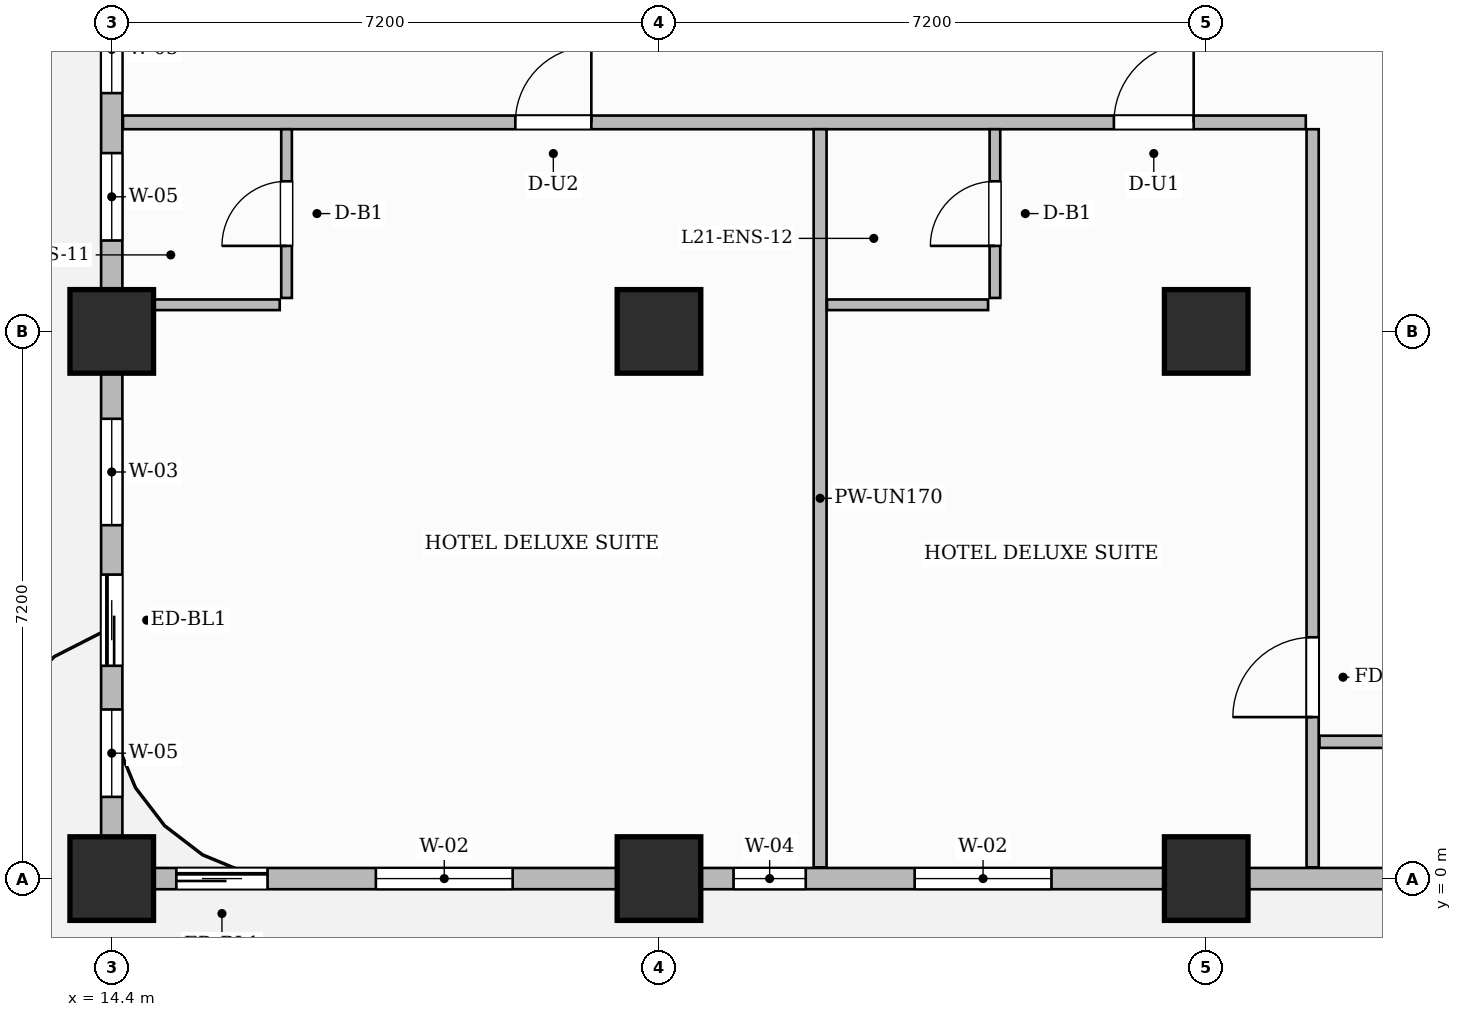
"""IFC4 building model, lengths in metres.
Left out: names, types, materials, properties, quantities, classifications, styles, units other than length and angle.
Written with IfcOpenShell. Run it as: python <this file> out.ifc"""

import sys

from ifc_helpers import new_model, si_unit, direction, frame, frame_2d, origin, origin_2d, place, context, subcontext, project, spatial, rectangle, extrude, source, transform, mapped, element, fill, save


model = new_model("IFC4")
c1 = context("Model", 3, precision=1e-05, world=origin(), true_north=direction((0.0, 1.0)))
c2 = subcontext(c1, "Body", "Model", "MODEL_VIEW")
j1 = project(units=[si_unit("LENGTHUNIT", "METRE"), si_unit("PLANEANGLEUNIT", "RADIAN")], contexts=[c1])
p1 = place(None, origin())
s1 = spatial("IfcSite", under=j1, at=p1, CompositionType="ELEMENT")
p2 = place(p1, origin())
s2 = spatial("IfcBuilding", under=s1, at=p2, CompositionType="ELEMENT")
p3 = place(p2, frame((0.0, 0.0, 87.9)))
s3 = spatial("IfcBuildingStorey", under=s2, at=p3, CompositionType="ELEMENT", Elevation=87.9)
m1 = source(origin(), c2, "Body", "SweptSolid", [
    extrude(rectangle(XDim=1.1, YDim=1.1, at=origin_2d()), origin(), (0.0, 0.0, 1.0), 3.7),
])
for number, where, z_axis, x_axis in (
    (1, (14.4, 0.0, 0.0), (0.0, 0.0, 1.0), (1.0, 0.0, 0.0)),
    (2, (14.4, 7.2, 0.0), (0.0, 0.0, 1.0), (1.0, 0.0, 0.0)),
    (3, (21.6, 0.0, 0.0), (0.0, 0.0, 1.0), (1.0, 0.0, 0.0)),
    (4, (21.6, 7.2, 0.0), (0.0, 0.0, 1.0), (1.0, 0.0, 0.0)),
    (5, (28.8, 0.0, 0.0), (0.0, 0.0, 1.0), (1.0, 0.0, 0.0)),
    (6, (28.8, 7.2, 0.0), (0.0, 0.0, 1.0), (1.0, 0.0, 0.0)),
):
    element("IfcColumn", number, at=place(p3, frame(where, z_axis=z_axis, x_axis=x_axis)), inside=s3, PredefinedType="COLUMN", context=c2, shape_type="MappedRepresentation", body=[
        mapped(m1, transform((0.0, 0.0, 0.0), scale=1.0)),
    ])
p4 = place(p3, frame((14.548, 9.95, 0.0), z_axis=(0.0, 0.0, 1.0), x_axis=(1.0, 0.0, 0.0)))
e7 = element("IfcWall", 7, at=p4, inside=s3, PredefinedType="PARTITIONING", context=c2, shape_type="SweptSolid", body=[
    extrude(rectangle(XDim=15.562, YDim=0.18, at=frame_2d((7.781, 0.0))), origin(), (0.0, 0.0, 1.0), 3.45),
])
p5 = place(p4, frame((5.162, 0.0, 0.0)))
e8 = element("IfcOpeningElement", 8, at=p5, cuts=e7, PredefinedType="OPENING", context=c2, shape_type="SweptSolid", body=[
    extrude(rectangle(XDim=1.0, YDim=2.2, at=frame_2d((0.5, 1.1))), frame((0.0, 0.1, 0.0), z_axis=(0.0, -1.0, 0.0), x_axis=(1.0, 0.0, 0.0)), (0.0, 0.0, 1.0), 0.2),
])
p6 = place(p4, frame((13.037, 0.0, 0.0)))
e9 = element("IfcOpeningElement", 9, at=p6, cuts=e7, PredefinedType="OPENING", context=c2, shape_type="SweptSolid", body=[
    extrude(rectangle(XDim=1.05, YDim=2.25, at=frame_2d((0.525, 1.125))), frame((0.0, 0.1, 0.0), z_axis=(0.0, -1.0, 0.0), x_axis=(1.0, 0.0, 0.0)), (0.0, 0.0, 1.0), 0.2),
])
p7 = place(p3, frame((30.2, 0.148, 0.0), z_axis=(0.0, 0.0, 1.0), x_axis=(0.0, 1.0, 0.0)))
e10 = element("IfcWall", 10, at=p7, inside=s3, PredefinedType="PARTITIONING", context=c2, shape_type="SweptSolid", body=[
    extrude(rectangle(XDim=9.712, YDim=0.16, at=frame_2d((4.856, 0.0))), origin(), (0.0, 0.0, 1.0), 3.45),
])
p8 = place(p7, frame((1.977, 0.0, 0.0)))
e11 = element("IfcOpeningElement", 11, at=p8, cuts=e10, PredefinedType="OPENING", context=c2, shape_type="SweptSolid", body=[
    extrude(rectangle(XDim=1.05, YDim=2.15, at=frame_2d((0.525, 1.075))), frame((0.0, 0.09, 0.0), z_axis=(0.0, -1.0, 0.0), x_axis=(1.0, 0.0, 0.0)), (0.0, 0.0, 1.0), 0.18),
])
p9 = place(p3, frame((30.29, 1.8, 0.0), z_axis=(0.0, 0.0, 1.0), x_axis=(1.0, 0.0, 0.0)))
e12 = element("IfcWall", 12, at=p9, inside=s3, PredefinedType="PARTITIONING", context=c2, shape_type="SweptSolid", body=[
    extrude(rectangle(XDim=19.37, YDim=0.16, at=frame_2d((9.685, 0.0))), origin(), (0.0, 0.0, 1.0), 3.45),
])
p10 = place(p9, frame((9.735, 0.0, 0.0)))
e13 = element("IfcOpeningElement", 13, at=p10, cuts=e12, PredefinedType="OPENING", context=c2, shape_type="SweptSolid", body=[
    extrude(rectangle(XDim=0.95, YDim=2.15, at=frame_2d((0.475, 1.075))), frame((0.0, 0.09, 0.0), z_axis=(0.0, -1.0, 0.0), x_axis=(1.0, 0.0, 0.0)), (0.0, 0.0, 1.0), 0.18),
])
p11 = place(p3, frame((23.72, 0.148, 0.0), z_axis=(0.0, 0.0, 1.0), x_axis=(0.0, 1.0, 0.0)))
e14 = element("IfcWall", 14, at=p11, inside=s3, PredefinedType="PARTITIONING", context=c2, shape_type="SweptSolid", body=[
    extrude(rectangle(XDim=9.712, YDim=0.17, at=frame_2d((4.856, 0.0))), origin(), (0.0, 0.0, 1.0), 3.45),
])
p12 = place(p3, frame((16.7, 7.64, 0.0), z_axis=(0.0, 0.0, 1.0), x_axis=(0.0, 1.0, 0.0)))
e15 = element("IfcWall", 15, at=p12, inside=s3, PredefinedType="PARTITIONING", context=c2, shape_type="SweptSolid", body=[
    extrude(rectangle(XDim=2.22, YDim=0.14, at=frame_2d((1.11, 0.0))), origin(), (0.0, 0.0, 1.0), 3.45),
])
p13 = place(p12, frame((0.685, 0.0, 0.0)))
e16 = element("IfcOpeningElement", 16, at=p13, cuts=e15, PredefinedType="OPENING", context=c2, shape_type="SweptSolid", body=[
    extrude(rectangle(XDim=0.85, YDim=2.1, at=frame_2d((0.425, 1.05))), frame((0.0, 0.08, 0.0), z_axis=(0.0, -1.0, 0.0), x_axis=(1.0, 0.0, 0.0)), (0.0, 0.0, 1.0), 0.16),
])
p14 = place(p3, frame((14.49, 7.55, 0.0), z_axis=(0.0, 0.0, 1.0), x_axis=(1.0, 0.0, 0.0)))
e17 = element("IfcWall", 17, at=p14, inside=s3, PredefinedType="PARTITIONING", context=c2, shape_type="SweptSolid", body=[
    extrude(rectangle(XDim=2.12, YDim=0.14, at=frame_2d((1.06, 0.0))), origin(), (0.0, 0.0, 1.0), 3.45),
])
p15 = place(p3, frame((26.02, 7.64, 0.0), z_axis=(0.0, 0.0, 1.0), x_axis=(0.0, 1.0, 0.0)))
e18 = element("IfcWall", 18, at=p15, inside=s3, PredefinedType="PARTITIONING", context=c2, shape_type="SweptSolid", body=[
    extrude(rectangle(XDim=2.22, YDim=0.14, at=frame_2d((1.11, 0.0))), origin(), (0.0, 0.0, 1.0), 3.45),
])
p16 = place(p15, frame((0.685, 0.0, 0.0)))
e19 = element("IfcOpeningElement", 19, at=p16, cuts=e18, PredefinedType="OPENING", context=c2, shape_type="SweptSolid", body=[
    extrude(rectangle(XDim=0.85, YDim=2.1, at=frame_2d((0.425, 1.05))), frame((0.0, 0.08, 0.0), z_axis=(0.0, -1.0, 0.0), x_axis=(1.0, 0.0, 0.0)), (0.0, 0.0, 1.0), 0.16),
])
p17 = place(p3, frame((23.81, 7.55, 0.0), z_axis=(0.0, 0.0, 1.0), x_axis=(1.0, 0.0, 0.0)))
e20 = element("IfcWall", 20, at=p17, inside=s3, PredefinedType="PARTITIONING", context=c2, shape_type="SweptSolid", body=[
    extrude(rectangle(XDim=2.12, YDim=0.14, at=frame_2d((1.06, 0.0))), origin(), (0.0, 0.0, 1.0), 3.45),
])
p18 = place(p3, frame((14.4, 0.0, 0.0), z_axis=(0.0, 0.0, 1.0), x_axis=(1.0, 0.0, 0.0)))
e21 = element("IfcWall", 21, at=p18, inside=s3, PredefinedType="SOLIDWALL", context=c2, shape_type="SweptSolid", body=[
    extrude(rectangle(XDim=43.2, YDim=0.28, at=frame_2d((21.6, 0.0))), origin(), (0.0, 0.0, 1.0), 2.885),
])
p19 = place(p18, frame((0.85, 0.0, 0.0)))
e22 = element("IfcOpeningElement", 22, at=p19, cuts=e21, PredefinedType="OPENING", context=c2, shape_type="SweptSolid", body=[
    extrude(rectangle(XDim=1.2, YDim=2.2, at=frame_2d((0.6, 1.1))), frame((0.0, 0.15, 0.0), z_axis=(0.0, -1.0, 0.0), x_axis=(1.0, 0.0, 0.0)), (0.0, 0.0, 1.0), 0.3),
])
p20 = place(p18, frame((3.475, 0.0, 0.8)))
e23 = element("IfcOpeningElement", 23, at=p20, cuts=e21, PredefinedType="OPENING", context=c2, shape_type="SweptSolid", body=[
    extrude(rectangle(XDim=1.8, YDim=1.85, at=frame_2d((0.9, 0.925))), frame((0.0, 0.15, 0.0), z_axis=(0.0, -1.0, 0.0), x_axis=(1.0, 0.0, 0.0)), (0.0, 0.0, 1.0), 0.3),
])
p21 = place(p18, frame((8.181, 0.0, 0.8)))
e24 = element("IfcOpeningElement", 24, at=p21, cuts=e21, PredefinedType="OPENING", context=c2, shape_type="SweptSolid", body=[
    extrude(rectangle(XDim=0.95, YDim=1.75, at=frame_2d((0.475, 0.875))), frame((0.0, 0.15, 0.0), z_axis=(0.0, -1.0, 0.0), x_axis=(1.0, 0.0, 0.0)), (0.0, 0.0, 1.0), 0.3),
])
p22 = place(p18, frame((10.564, 0.0, 0.8)))
e25 = element("IfcOpeningElement", 25, at=p22, cuts=e21, PredefinedType="OPENING", context=c2, shape_type="SweptSolid", body=[
    extrude(rectangle(XDim=1.8, YDim=1.85, at=frame_2d((0.9, 0.925))), frame((0.0, 0.15, 0.0), z_axis=(0.0, -1.0, 0.0), x_axis=(1.0, 0.0, 0.0)), (0.0, 0.0, 1.0), 0.3),
])
p23 = place(p18, frame((16.804, 0.0, 0.8)))
e26 = element("IfcOpeningElement", 26, at=p23, cuts=e21, PredefinedType="OPENING", context=c2, shape_type="SweptSolid", body=[
    extrude(rectangle(XDim=1.8, YDim=1.85, at=frame_2d((0.9, 0.925))), frame((0.0, 0.15, 0.0), z_axis=(0.0, -1.0, 0.0), x_axis=(1.0, 0.0, 0.0)), (0.0, 0.0, 1.0), 0.3),
])
p24 = place(p18, frame((21.725, 0.0, 0.8)))
e27 = element("IfcOpeningElement", 27, at=p24, cuts=e21, PredefinedType="OPENING", context=c2, shape_type="SweptSolid", body=[
    extrude(rectangle(XDim=1.8, YDim=1.85, at=frame_2d((0.9, 0.925))), frame((0.0, 0.15, 0.0), z_axis=(0.0, -1.0, 0.0), x_axis=(1.0, 0.0, 0.0)), (0.0, 0.0, 1.0), 0.3),
])
p25 = place(p18, frame((24.475, 0.0, 0.8)))
e28 = element("IfcOpeningElement", 28, at=p25, cuts=e21, PredefinedType="OPENING", context=c2, shape_type="SweptSolid", body=[
    extrude(rectangle(XDim=1.8, YDim=1.85, at=frame_2d((0.9, 0.925))), frame((0.0, 0.15, 0.0), z_axis=(0.0, -1.0, 0.0), x_axis=(1.0, 0.0, 0.0)), (0.0, 0.0, 1.0), 0.3),
])
p26 = place(p18, frame((29.075, 0.0, 0.8)))
e29 = element("IfcOpeningElement", 29, at=p26, cuts=e21, PredefinedType="OPENING", context=c2, shape_type="SweptSolid", body=[
    extrude(rectangle(XDim=1.8, YDim=1.85, at=frame_2d((0.9, 0.925))), frame((0.0, 0.15, 0.0), z_axis=(0.0, -1.0, 0.0), x_axis=(1.0, 0.0, 0.0)), (0.0, 0.0, 1.0), 0.3),
])
p27 = place(p18, frame((32.125, 0.0, 0.8)))
e30 = element("IfcOpeningElement", 30, at=p27, cuts=e21, PredefinedType="OPENING", context=c2, shape_type="SweptSolid", body=[
    extrude(rectangle(XDim=1.8, YDim=1.85, at=frame_2d((0.9, 0.925))), frame((0.0, 0.15, 0.0), z_axis=(0.0, -1.0, 0.0), x_axis=(1.0, 0.0, 0.0)), (0.0, 0.0, 1.0), 0.3),
])
p28 = place(p18, frame((36.875, 0.0, 0.8)))
e31 = element("IfcOpeningElement", 31, at=p28, cuts=e21, PredefinedType="OPENING", context=c2, shape_type="SweptSolid", body=[
    extrude(rectangle(XDim=1.8, YDim=1.85, at=frame_2d((0.9, 0.925))), frame((0.0, 0.15, 0.0), z_axis=(0.0, -1.0, 0.0), x_axis=(1.0, 0.0, 0.0)), (0.0, 0.0, 1.0), 0.3),
])
p29 = place(p18, frame((39.925, 0.0, 0.8)))
e32 = element("IfcOpeningElement", 32, at=p29, cuts=e21, PredefinedType="OPENING", context=c2, shape_type="SweptSolid", body=[
    extrude(rectangle(XDim=1.8, YDim=1.85, at=frame_2d((0.9, 0.925))), frame((0.0, 0.15, 0.0), z_axis=(0.0, -1.0, 0.0), x_axis=(1.0, 0.0, 0.0)), (0.0, 0.0, 1.0), 0.3),
])
p30 = place(p3, frame((14.4, 0.05, 0.0), z_axis=(0.0, 0.0, 1.0), x_axis=(0.0, 1.0, 0.0)))
e33 = element("IfcWall", 33, at=p30, inside=s3, PredefinedType="SOLIDWALL", context=c2, shape_type="SweptSolid", body=[
    extrude(rectangle(XDim=20.6, YDim=0.28, at=frame_2d((10.3, 0.0))), origin(), (0.0, 0.0, 1.0), 2.885),
])
p31 = place(p30, frame((2.75, 0.0, 0.0)))
e34 = element("IfcOpeningElement", 34, at=p31, cuts=e33, PredefinedType="OPENING", context=c2, shape_type="SweptSolid", body=[
    extrude(rectangle(XDim=1.2, YDim=2.2, at=frame_2d((0.6, 1.1))), frame((0.0, 0.15, 0.0), z_axis=(0.0, -1.0, 0.0), x_axis=(1.0, 0.0, 0.0)), (0.0, 0.0, 1.0), 0.3),
])
p32 = place(p30, frame((1.025, 0.0, 0.8)))
e35 = element("IfcOpeningElement", 35, at=p32, cuts=e33, PredefinedType="OPENING", context=c2, shape_type="SweptSolid", body=[
    extrude(rectangle(XDim=1.15, YDim=1.8, at=frame_2d((0.575, 0.9))), frame((0.0, 0.15, 0.0), z_axis=(0.0, -1.0, 0.0), x_axis=(1.0, 0.0, 0.0)), (0.0, 0.0, 1.0), 0.3),
])
p33 = place(p30, frame((4.6, 0.0, 0.8)))
e36 = element("IfcOpeningElement", 36, at=p33, cuts=e33, PredefinedType="OPENING", context=c2, shape_type="SweptSolid", body=[
    extrude(rectangle(XDim=1.4, YDim=1.85, at=frame_2d((0.7, 0.925))), frame((0.0, 0.15, 0.0), z_axis=(0.0, -1.0, 0.0), x_axis=(1.0, 0.0, 0.0)), (0.0, 0.0, 1.0), 0.3),
])
p34 = place(p30, frame((8.346, 0.0, 0.8)))
e37 = element("IfcOpeningElement", 37, at=p34, cuts=e33, PredefinedType="OPENING", context=c2, shape_type="SweptSolid", body=[
    extrude(rectangle(XDim=1.15, YDim=1.8, at=frame_2d((0.575, 0.9))), frame((0.0, 0.15, 0.0), z_axis=(0.0, -1.0, 0.0), x_axis=(1.0, 0.0, 0.0)), (0.0, 0.0, 1.0), 0.3),
])
p35 = place(p30, frame((10.285, 0.0, 0.8)))
e38 = element("IfcOpeningElement", 38, at=p35, cuts=e33, PredefinedType="OPENING", context=c2, shape_type="SweptSolid", body=[
    extrude(rectangle(XDim=1.15, YDim=1.8, at=frame_2d((0.575, 0.9))), frame((0.0, 0.15, 0.0), z_axis=(0.0, -1.0, 0.0), x_axis=(1.0, 0.0, 0.0)), (0.0, 0.0, 1.0), 0.3),
])
p36 = place(p30, frame((12.114, 0.0, 0.8)))
e39 = element("IfcOpeningElement", 39, at=p36, cuts=e33, PredefinedType="OPENING", context=c2, shape_type="SweptSolid", body=[
    extrude(rectangle(XDim=1.15, YDim=1.8, at=frame_2d((0.575, 0.9))), frame((0.0, 0.15, 0.0), z_axis=(0.0, -1.0, 0.0), x_axis=(1.0, 0.0, 0.0)), (0.0, 0.0, 1.0), 0.3),
])
p37 = place(p30, frame((16.79, 0.0, 0.8)))
e40 = element("IfcOpeningElement", 40, at=p37, cuts=e33, PredefinedType="OPENING", context=c2, shape_type="SweptSolid", body=[
    extrude(rectangle(XDim=1.8, YDim=1.85, at=frame_2d((0.9, 0.925))), frame((0.0, 0.15, 0.0), z_axis=(0.0, -1.0, 0.0), x_axis=(1.0, 0.0, 0.0)), (0.0, 0.0, 1.0), 0.3),
])
m2 = source(origin(), c2, "Body", "SweptSolid", [
    extrude(rectangle(XDim=1.05, YDim=2.15, at=frame_2d((0.525, 1.075))), frame((0.0, 0.025, 0.0), z_axis=(0.0, -1.0, 0.0), x_axis=(1.0, 0.0, 0.0)), (0.0, 0.0, 1.0), 0.05),
])
p38 = place(p8, origin())
e41 = element("IfcDoor", 41, at=p38, inside=s3, OperationType="SINGLE_SWING_LEFT", PredefinedType="DOOR", context=c2, shape_type="MappedRepresentation", body=[
    mapped(m2, transform((0.0, 0.0, 0.0), scale=1.0)),
])
fill(e11, e41)
m3 = source(origin(), c2, "Body", "SweptSolid", [
    extrude(rectangle(XDim=0.85, YDim=2.1, at=frame_2d((0.425, 1.05))), frame((0.0, 0.025, 0.0), z_axis=(0.0, -1.0, 0.0), x_axis=(1.0, 0.0, 0.0)), (0.0, 0.0, 1.0), 0.05),
])
p39 = place(p13, origin())
e42 = element("IfcDoor", 42, at=p39, inside=s3, OperationType="SINGLE_SWING_LEFT", PredefinedType="DOOR", context=c2, shape_type="MappedRepresentation", body=[
    mapped(m3, transform((0.0, 0.0, 0.0), scale=1.0)),
])
fill(e16, e42)
m4 = source(origin(), c2, "Body", "SweptSolid", [
    extrude(rectangle(XDim=1.0, YDim=2.2, at=frame_2d((0.5, 1.1))), frame((0.0, 0.025, 0.0), z_axis=(0.0, -1.0, 0.0), x_axis=(1.0, 0.0, 0.0)), (0.0, 0.0, 1.0), 0.05),
])
p40 = place(p5, origin())
e43 = element("IfcDoor", 43, at=p40, inside=s3, OperationType="SINGLE_SWING_RIGHT", PredefinedType="DOOR", context=c2, shape_type="MappedRepresentation", body=[
    mapped(m4, transform((0.0, 0.0, 0.0), scale=1.0)),
])
fill(e8, e43)
p41 = place(p16, origin())
e44 = element("IfcDoor", 44, at=p41, inside=s3, OperationType="SINGLE_SWING_LEFT", PredefinedType="DOOR", context=c2, shape_type="MappedRepresentation", body=[
    mapped(m3, transform((0.0, 0.0, 0.0), scale=1.0)),
])
fill(e19, e44)
m5 = source(origin(), c2, "Body", "SweptSolid", [
    extrude(rectangle(XDim=1.05, YDim=2.25, at=frame_2d((0.525, 1.125))), frame((0.0, 0.025, 0.0), z_axis=(0.0, -1.0, 0.0), x_axis=(1.0, 0.0, 0.0)), (0.0, 0.0, 1.0), 0.05),
])
p42 = place(p6, origin())
e45 = element("IfcDoor", 45, at=p42, inside=s3, OperationType="SINGLE_SWING_RIGHT", PredefinedType="DOOR", context=c2, shape_type="MappedRepresentation", body=[
    mapped(m5, transform((0.0, 0.0, 0.0), scale=1.0)),
])
fill(e9, e45)
m6 = source(origin(), c2, "Body", "SweptSolid", [
    extrude(rectangle(XDim=1.2, YDim=2.2, at=frame_2d((0.6, 1.1))), frame((0.0, 0.025, 0.0), z_axis=(0.0, -1.0, 0.0), x_axis=(1.0, 0.0, 0.0)), (0.0, 0.0, 1.0), 0.05),
])
p43 = place(p19, origin())
e46 = element("IfcDoor", 46, at=p43, inside=s3, OperationType="SLIDING_TO_LEFT", PredefinedType="DOOR", context=c2, shape_type="MappedRepresentation", body=[
    mapped(m6, transform((0.0, 0.0, 0.0), scale=1.0)),
])
fill(e22, e46)
p44 = place(p31, origin())
e47 = element("IfcDoor", 47, at=p44, inside=s3, OperationType="SLIDING_TO_LEFT", PredefinedType="DOOR", context=c2, shape_type="MappedRepresentation", body=[
    mapped(m6, transform((0.0, 0.0, 0.0), scale=1.0)),
])
fill(e34, e47)
m7 = source(origin(), c2, "Body", "SweptSolid", [
    extrude(rectangle(XDim=1.8, YDim=1.85, at=frame_2d((0.9, 0.925))), frame((0.0, 0.03, 0.0), z_axis=(0.0, -1.0, 0.0), x_axis=(1.0, 0.0, 0.0)), (0.0, 0.0, 1.0), 0.06),
])
p45 = place(p20, origin())
e48 = element("IfcWindow", 48, at=p45, inside=s3, PartitioningType="DOUBLE_PANEL_VERTICAL", PredefinedType="WINDOW", context=c2, shape_type="MappedRepresentation", body=[
    mapped(m7, transform((0.0, 0.0, 0.0), scale=1.0)),
])
fill(e23, e48)
m8 = source(origin(), c2, "Body", "SweptSolid", [
    extrude(rectangle(XDim=0.95, YDim=1.75, at=frame_2d((0.475, 0.875))), frame((0.0, 0.03, 0.0), z_axis=(0.0, -1.0, 0.0), x_axis=(1.0, 0.0, 0.0)), (0.0, 0.0, 1.0), 0.06),
])
p46 = place(p21, origin())
e49 = element("IfcWindow", 49, at=p46, inside=s3, PartitioningType="SINGLE_PANEL", PredefinedType="WINDOW", context=c2, shape_type="MappedRepresentation", body=[
    mapped(m8, transform((0.0, 0.0, 0.0), scale=1.0)),
])
fill(e24, e49)
p47 = place(p22, origin())
e50 = element("IfcWindow", 50, at=p47, inside=s3, PartitioningType="DOUBLE_PANEL_VERTICAL", PredefinedType="WINDOW", context=c2, shape_type="MappedRepresentation", body=[
    mapped(m7, transform((0.0, 0.0, 0.0), scale=1.0)),
])
fill(e25, e50)
m9 = source(origin(), c2, "Body", "SweptSolid", [
    extrude(rectangle(XDim=1.15, YDim=1.8, at=frame_2d((0.575, 0.9))), frame((0.0, 0.03, 0.0), z_axis=(0.0, -1.0, 0.0), x_axis=(1.0, 0.0, 0.0)), (0.0, 0.0, 1.0), 0.06),
])
p48 = place(p32, origin())
e51 = element("IfcWindow", 51, at=p48, inside=s3, PartitioningType="SINGLE_PANEL", PredefinedType="WINDOW", context=c2, shape_type="MappedRepresentation", body=[
    mapped(m9, transform((0.0, 0.0, 0.0), scale=1.0)),
])
fill(e35, e51)
m10 = source(origin(), c2, "Body", "SweptSolid", [
    extrude(rectangle(XDim=1.4, YDim=1.85, at=frame_2d((0.7, 0.925))), frame((0.0, 0.03, 0.0), z_axis=(0.0, -1.0, 0.0), x_axis=(1.0, 0.0, 0.0)), (0.0, 0.0, 1.0), 0.06),
])
p49 = place(p33, origin())
e52 = element("IfcWindow", 52, at=p49, inside=s3, PartitioningType="SINGLE_PANEL", PredefinedType="WINDOW", context=c2, shape_type="MappedRepresentation", body=[
    mapped(m10, transform((0.0, 0.0, 0.0), scale=1.0)),
])
fill(e36, e52)
p50 = place(p34, origin())
e53 = element("IfcWindow", 53, at=p50, inside=s3, PartitioningType="SINGLE_PANEL", PredefinedType="WINDOW", context=c2, shape_type="MappedRepresentation", body=[
    mapped(m9, transform((0.0, 0.0, 0.0), scale=1.0)),
])
fill(e37, e53)
p51 = place(p35, origin())
e54 = element("IfcWindow", 54, at=p51, inside=s3, PartitioningType="SINGLE_PANEL", PredefinedType="WINDOW", context=c2, shape_type="MappedRepresentation", body=[
    mapped(m9, transform((0.0, 0.0, 0.0), scale=1.0)),
])
fill(e38, e54)
save(model, sys.argv[1])
